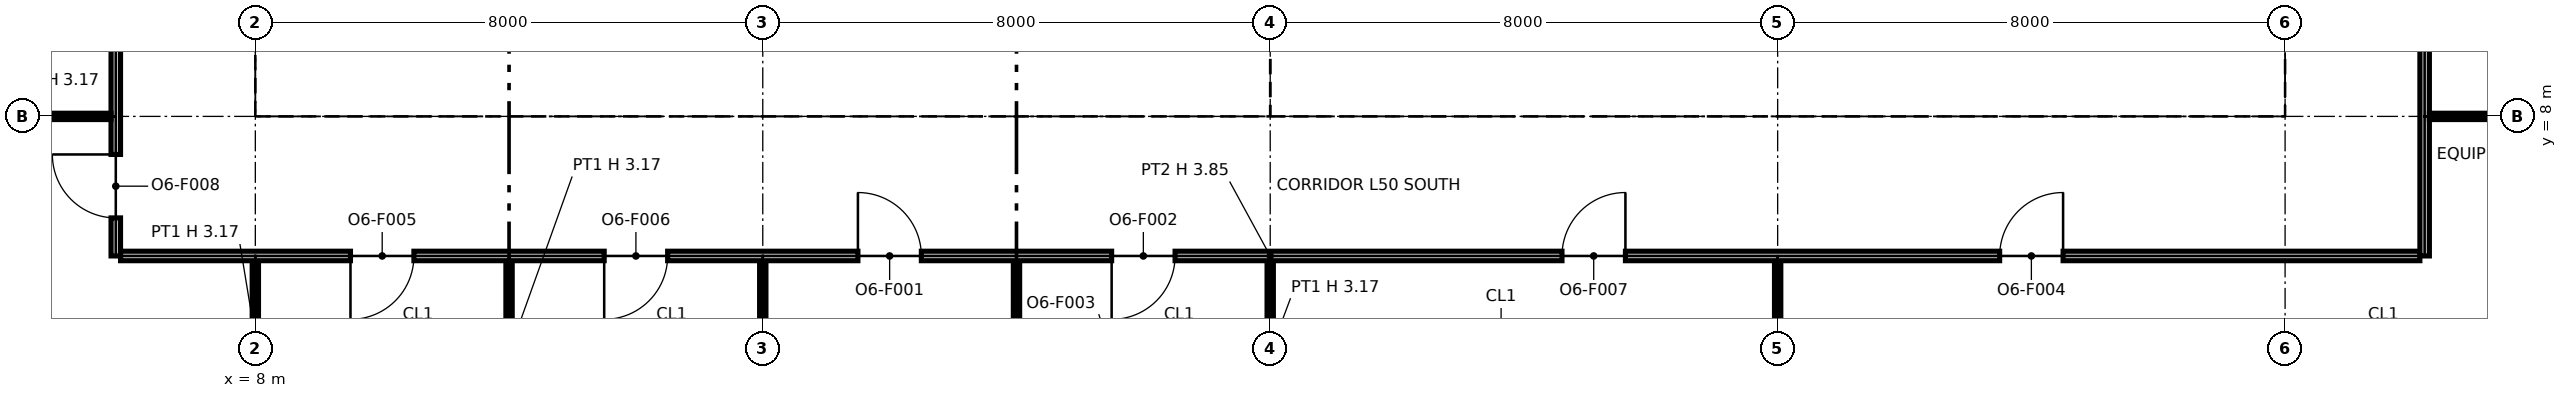
"""IFC4 building model, lengths in metres.
Left out: names, types, materials, properties, quantities, classifications, styles, units other than length and angle.
Written with IfcOpenShell. Run it as: python <this file> out.ifc"""

import sys

from ifc_helpers import new_model, si_unit, direction, frame, frame_2d, origin, origin_2d, place, context, subcontext, project, spatial, polyline, rectangle, i_section, outline, extrude, element, fill, save


model = new_model("IFC4")
c1 = context("Model", 3, precision=1e-05, world=origin(), true_north=direction((0.0, 1.0)))
c2 = subcontext(c1, "Body", "Model", "MODEL_VIEW")
j1 = project(units=[si_unit("LENGTHUNIT", "METRE"), si_unit("PLANEANGLEUNIT", "RADIAN")], contexts=[c1])
p1 = place(None, origin())
s1 = spatial("IfcSite", under=j1, at=p1, CompositionType="ELEMENT")
p2 = place(p1, origin())
s2 = spatial("IfcBuilding", under=s1, at=p2, CompositionType="ELEMENT")
p3 = place(p2, frame((0.0, 0.0, 233.0)))
s3 = spatial("IfcBuildingStorey", under=s2, at=p3, CompositionType="ELEMENT", Elevation=233.0)
for number, where, z_axis, x_axis in (
    (1, (8.0, 8.0, 0.0), (0.0, 0.0, 1.0), (1.0, 0.0, 0.0)),
    (2, (16.0, 8.0, 0.0), (0.0, 0.0, 1.0), (1.0, 0.0, 0.0)),
):
    element("IfcColumn", number, at=place(p3, frame(where, z_axis=z_axis, x_axis=x_axis)), inside=s3, PredefinedType="COLUMN", context=c2, shape_type="SweptSolid", body=[
        extrude(i_section(OverallWidth=0.373, OverallDepth=0.368, WebThickness=0.015, FlangeThickness=0.024, at=origin_2d()), origin(), (0.0, 0.0, 1.0), 3.85),
    ])
p4 = place(p3, frame((24.0, 8.0, 0.0), z_axis=(0.0, 0.0, 1.0), x_axis=(1.0, 0.0, 0.0)))
e3 = element("IfcColumn", 3, at=p4, inside=s3, PredefinedType="COLUMN", context=c2, shape_type="SweptSolid", body=[
    extrude(i_section(OverallWidth=0.394, OverallDepth=0.376, WebThickness=0.017, FlangeThickness=0.028, at=origin_2d()), origin(), (0.0, 0.0, 1.0), 3.85),
])
for number, where, z_axis, x_axis in (
    (4, (32.0, 8.0, 0.0), (0.0, 0.0, 1.0), (1.0, 0.0, 0.0)),
    (5, (40.0, 8.0, 0.0), (0.0, 0.0, 1.0), (1.0, 0.0, 0.0)),
):
    element("IfcColumn", number, at=place(p3, frame(where, z_axis=z_axis, x_axis=x_axis)), inside=s3, PredefinedType="COLUMN", context=c2, shape_type="SweptSolid", body=[
        extrude(i_section(OverallWidth=0.373, OverallDepth=0.368, WebThickness=0.015, FlangeThickness=0.024, at=origin_2d()), origin(), (0.0, 0.0, 1.0), 3.85),
    ])
p5 = place(p3, frame((8.65, 8.75, 0.0), z_axis=(0.0, 0.0, 1.0), x_axis=(1.0, 0.0, 0.0)))
e6 = element("IfcWall", 6, at=p5, inside=s3, PredefinedType="PARTITIONING", context=c2, shape_type="SweptSolid", body=[
    extrude(outline(polyline([(0.0, 0.0), (14.7, 0.0), (14.7, 3.85), (7.438, 3.85), (7.438, 3.308), (7.262, 3.308), (7.261, 3.85), (0.0, 3.85), (0.0, 0.0)])), frame((0.0, 0.1, 0.0), z_axis=(0.0, -1.0, 0.0), x_axis=(1.0, 0.0, 0.0)), (0.0, 0.0, 1.0), 0.2),
])
p6 = place(p5, frame((1.3, 0.0, 0.0)))
e7 = element("IfcOpeningElement", 7, at=p6, cuts=e6, PredefinedType="OPENING", context=c2, shape_type="SweptSolid", body=[
    extrude(rectangle(XDim=1.4, YDim=2.1, at=frame_2d((0.7, 1.05))), frame((0.0, 0.11, 0.0), z_axis=(0.0, -1.0, 0.0), x_axis=(1.0, 0.0, 0.0)), (0.0, 0.0, 1.0), 0.22),
])
p7 = place(p5, frame((4.6, 0.0, 0.0)))
e8 = element("IfcOpeningElement", 8, at=p7, cuts=e6, PredefinedType="OPENING", context=c2, shape_type="SweptSolid", body=[
    extrude(rectangle(XDim=1.4, YDim=2.1, at=frame_2d((0.7, 1.05))), frame((0.0, 0.11, 0.0), z_axis=(0.0, -1.0, 0.0), x_axis=(1.0, 0.0, 0.0)), (0.0, 0.0, 1.0), 0.22),
])
p8 = place(p5, frame((10.4, 0.0, 0.0)))
e9 = element("IfcOpeningElement", 9, at=p8, cuts=e6, PredefinedType="OPENING", context=c2, shape_type="SweptSolid", body=[
    extrude(rectangle(XDim=1.2, YDim=2.1, at=frame_2d((0.6, 1.05))), frame((0.0, 0.11, 0.0), z_axis=(0.0, -1.0, 0.0), x_axis=(1.0, 0.0, 0.0)), (0.0, 0.0, 1.0), 0.22),
])
p9 = place(p3, frame((8.75, 8.85, 0.0), z_axis=(0.0, 0.0, 1.0), x_axis=(0.0, 1.0, 0.0)))
e10 = element("IfcWall", 10, at=p9, inside=s3, PredefinedType="PARTITIONING", context=c2, shape_type="SweptSolid", body=[
    extrude(outline(polyline([(0.0, 0.0), (14.3, 0.0), (14.3, 3.85), (10.225, 3.85), (10.224, 3.44), (10.076, 3.44), (10.075, 3.85), (7.239, 3.85), (7.238, 3.308), (7.062, 3.308), (7.062, 3.85), (0.0, 3.85), (0.0, 0.0)])), frame((0.0, 0.1, 0.0), z_axis=(0.0, -1.0, 0.0), x_axis=(1.0, 0.0, 0.0)), (0.0, 0.0, 1.0), 0.2),
])
p10 = place(p9, frame((8.3, 0.0, 0.0)))
e11 = element("IfcOpeningElement", 11, at=p10, cuts=e10, PredefinedType="OPENING", context=c2, shape_type="SweptSolid", body=[
    extrude(rectangle(XDim=1.8, YDim=2.1, at=frame_2d((0.9, 1.05))), frame((0.0, 0.11, 0.0), z_axis=(0.0, -1.0, 0.0), x_axis=(1.0, 0.0, 0.0)), (0.0, 0.0, 1.0), 0.22),
])
p11 = place(p3, frame((12.4, 8.85, 0.0), z_axis=(0.0, 0.0, 1.0), x_axis=(0.0, 1.0, 0.0)))
e12 = element("IfcWall", 12, at=p11, inside=s3, PredefinedType="PARTITIONING", context=c2, shape_type="SweptSolid", body=[
    extrude(rectangle(XDim=6.85, YDim=0.2, at=frame_2d((3.425, 0.0))), origin(), (0.0, 0.0, 1.0), 3.85),
])
p12 = place(p3, frame((15.85, 8.85, 0.0), z_axis=(0.0, 0.0, 1.0), x_axis=(0.0, 1.0, 0.0)))
e13 = element("IfcWall", 13, at=p12, inside=s3, PredefinedType="PARTITIONING", context=c2, shape_type="SweptSolid", body=[
    extrude(rectangle(XDim=1.55, YDim=0.9, at=frame_2d((0.775, 0.0))), origin(), (0.0, 0.0, 1.0), 3.308),
])
p13 = place(p12, frame((0.3, 0.0, 0.0)))
e14 = element("IfcOpeningElement", 14, at=p13, cuts=e13, PredefinedType="OPENING", context=c2, shape_type="SweptSolid", body=[
    extrude(rectangle(XDim=1.1, YDim=2.1, at=frame_2d((0.55, 1.05))), frame((0.0, 0.46, 0.0), z_axis=(0.0, -1.0, 0.0), x_axis=(1.0, 0.0, 0.0)), (0.0, 0.0, 1.0), 0.92),
])
p14 = place(p3, frame((23.25, 8.85, 0.0), z_axis=(0.0, 0.0, 1.0), x_axis=(0.0, 1.0, 0.0)))
e15 = element("IfcWall", 15, at=p14, inside=s3, PredefinedType="PARTITIONING", context=c2, shape_type="SweptSolid", body=[
    extrude(outline(polyline([(0.0, 0.0), (14.3, 0.0), (14.3, 3.85), (10.225, 3.85), (10.224, 3.44), (10.076, 3.44), (10.075, 3.85), (7.239, 3.85), (7.238, 3.308), (7.062, 3.308), (7.062, 3.85), (5.225, 3.85), (5.224, 3.44), (5.076, 3.44), (5.075, 3.85), (0.0, 3.85), (0.0, 0.0)])), frame((0.0, 0.1, 0.0), z_axis=(0.0, -1.0, 0.0), x_axis=(1.0, 0.0, 0.0)), (0.0, 0.0, 1.0), 0.2),
])
p15 = place(p14, frame((8.3, 0.0, 0.0)))
e16 = element("IfcOpeningElement", 16, at=p15, cuts=e15, PredefinedType="OPENING", context=c2, shape_type="SweptSolid", body=[
    extrude(rectangle(XDim=1.8, YDim=2.1, at=frame_2d((0.9, 1.05))), frame((0.0, 0.11, 0.0), z_axis=(0.0, -1.0, 0.0), x_axis=(1.0, 0.0, 0.0)), (0.0, 0.0, 1.0), 0.22),
])
p16 = place(p3, frame((24.65, 8.75, 0.0), z_axis=(0.0, 0.0, 1.0), x_axis=(1.0, 0.0, 0.0)))
e17 = element("IfcWall", 17, at=p16, inside=s3, PredefinedType="PARTITIONING", context=c2, shape_type="SweptSolid", body=[
    extrude(outline(polyline([(0.0, 0.0), (14.7, 0.0), (14.7, 3.85), (7.438, 3.85), (7.438, 3.308), (7.262, 3.308), (7.261, 3.85), (0.0, 3.85), (0.0, 0.0)])), frame((0.0, 0.1, 0.0), z_axis=(0.0, -1.0, 0.0), x_axis=(1.0, 0.0, 0.0)), (0.0, 0.0, 1.0), 0.2),
])
p17 = place(p3, frame((24.75, 8.85, 0.0), z_axis=(0.0, 0.0, 1.0), x_axis=(0.0, 1.0, 0.0)))
e18 = element("IfcWall", 18, at=p17, inside=s3, PredefinedType="PARTITIONING", context=c2, shape_type="SweptSolid", body=[
    extrude(outline(polyline([(0.0, 0.0), (6.3, 0.0), (6.3, 3.85), (3.225, 3.85), (3.224, 3.44), (3.076, 3.44), (3.075, 3.85), (0.0, 3.85), (0.0, 0.0)])), frame((0.0, 0.1, 0.0), z_axis=(0.0, -1.0, 0.0), x_axis=(1.0, 0.0, 0.0)), (0.0, 0.0, 1.0), 0.2),
])
for number, where, z_axis, x_axis in (
    (19, (27.2, 8.85, 0.0), (0.0, 0.0, 1.0), (0.0, 1.0, 0.0)),
    (20, (29.5, 8.85, 0.0), (0.0, 0.0, 1.0), (0.0, 1.0, 0.0)),
):
    element("IfcWall", number, at=place(p3, frame(where, z_axis=z_axis, x_axis=x_axis)), inside=s3, PredefinedType="PARTITIONING", context=c2, shape_type="SweptSolid", body=[
        extrude(rectangle(XDim=2.55, YDim=0.2, at=frame_2d((1.275, 0.0))), origin(), (0.0, 0.0, 1.0), 3.85),
    ])
p18 = place(p3, frame((32.0, 8.85, 0.0), z_axis=(0.0, 0.0, 1.0), x_axis=(0.0, 1.0, 0.0)))
e21 = element("IfcWall", 21, at=p18, inside=s3, PredefinedType="PARTITIONING", context=c2, shape_type="SweptSolid", body=[
    extrude(rectangle(XDim=2.55, YDim=0.6, at=frame_2d((1.275, 0.0))), origin(), (0.0, 0.0, 1.0), 3.308),
])
for number, where, z_axis, x_axis in (
    (22, (35.6, 8.85, 0.0), (0.0, 0.0, 1.0), (0.0, 1.0, 0.0)),
    (23, (39.25, 8.85, 0.0), (0.0, 0.0, 1.0), (0.0, 1.0, 0.0)),
):
    element("IfcWall", number, at=place(p3, frame(where, z_axis=z_axis, x_axis=x_axis)), inside=s3, PredefinedType="PARTITIONING", context=c2, shape_type="SweptSolid", body=[
        extrude(rectangle(XDim=6.3, YDim=0.2, at=frame_2d((3.15, 0.0))), origin(), (0.0, 0.0, 1.0), 3.85),
    ])
p19 = place(p3, frame((20.0, 2.8, 0.0), z_axis=(0.0, 0.0, 1.0), x_axis=(0.0, 1.0, 0.0)))
e24 = element("IfcWall", 24, at=p19, inside=s3, PredefinedType="PARTITIONING", context=c2, shape_type="SweptSolid", body=[
    extrude(rectangle(XDim=2.925, YDim=0.1, at=frame_2d((1.462, 0.0))), origin(), (0.0, 0.0, 1.0), 3.172),
])
for number, where, z_axis, x_axis in (
    (25, (12.0, 2.83, 0.0), (0.0, 0.0, 1.0), (0.0, 1.0, 0.0)),
    (26, (16.0, 2.83, 0.0), (0.0, 0.0, 1.0), (0.0, 1.0, 0.0)),
    (27, (24.0, 2.83, 0.0), (0.0, 0.0, 1.0), (0.0, 1.0, 0.0)),
    (28, (32.0, 2.83, 0.0), (0.0, 0.0, 1.0), (0.0, 1.0, 0.0)),
):
    element("IfcWall", number, at=place(p3, frame(where, z_axis=z_axis, x_axis=x_axis)), inside=s3, PredefinedType="PARTITIONING", context=c2, shape_type="SweptSolid", body=[
        extrude(rectangle(XDim=2.895, YDim=0.1, at=frame_2d((1.448, 0.0))), origin(), (0.0, 0.0, 1.0), 3.172),
    ])
p20 = place(p3, frame((8.0, 3.3, 0.0), z_axis=(0.0, 0.0, 1.0), x_axis=(0.0, 1.0, 0.0)))
e29 = element("IfcWall", 29, at=p20, inside=s3, PredefinedType="PARTITIONING", context=c2, shape_type="SweptSolid", body=[
    extrude(rectangle(XDim=2.425, YDim=0.1, at=frame_2d((1.212, 0.0))), origin(), (0.0, 0.0, 1.0), 3.172),
])
p21 = place(p3, frame((5.875, 5.8, 0.0), z_axis=(0.0, 0.0, 1.0), x_axis=(1.0, 0.0, 0.0)))
e30 = element("IfcWall", 30, at=p21, inside=s3, PredefinedType="PARTITIONING", context=c2, shape_type="SweptSolid", body=[
    extrude(rectangle(XDim=36.25, YDim=0.15, at=frame_2d((18.125, 0.0))), origin(), (0.0, 0.0, 1.0), 3.85),
])
p22 = place(p21, frame((11.625, 0.0, 0.0)))
e31 = element("IfcOpeningElement", 31, at=p22, cuts=e30, PredefinedType="OPENING", context=c2, shape_type="SweptSolid", body=[
    extrude(rectangle(XDim=1.0, YDim=2.1, at=frame_2d((0.5, 1.05))), frame((0.0, 0.085, 0.0), z_axis=(0.0, -1.0, 0.0), x_axis=(1.0, 0.0, 0.0)), (0.0, 0.0, 1.0), 0.17),
])
p23 = place(p21, frame((16.625, 0.0, 0.0), z_axis=(0.0, 0.0, 1.0), x_axis=(-1.0, 0.0, 0.0)))
e32 = element("IfcOpeningElement", 32, at=p23, cuts=e30, PredefinedType="OPENING", context=c2, shape_type="SweptSolid", body=[
    extrude(rectangle(XDim=1.0, YDim=2.1, at=frame_2d((0.5, 1.05))), frame((0.0, 0.085, 0.0), z_axis=(0.0, -1.0, 0.0), x_axis=(1.0, 0.0, 0.0)), (0.0, 0.0, 1.0), 0.17),
])
p24 = place(p21, frame((29.625, 0.0, 0.0)))
e33 = element("IfcOpeningElement", 33, at=p24, cuts=e30, PredefinedType="OPENING", context=c2, shape_type="SweptSolid", body=[
    extrude(rectangle(XDim=1.0, YDim=2.1, at=frame_2d((0.5, 1.05))), frame((0.0, 0.085, 0.0), z_axis=(0.0, -1.0, 0.0), x_axis=(1.0, 0.0, 0.0)), (0.0, 0.0, 1.0), 0.17),
])
p25 = place(p21, frame((4.625, 0.0, 0.0), z_axis=(0.0, 0.0, 1.0), x_axis=(-1.0, 0.0, 0.0)))
e34 = element("IfcOpeningElement", 34, at=p25, cuts=e30, PredefinedType="OPENING", context=c2, shape_type="SweptSolid", body=[
    extrude(rectangle(XDim=1.0, YDim=2.1, at=frame_2d((0.5, 1.05))), frame((0.0, 0.085, 0.0), z_axis=(0.0, -1.0, 0.0), x_axis=(1.0, 0.0, 0.0)), (0.0, 0.0, 1.0), 0.17),
])
p26 = place(p21, frame((8.625, 0.0, 0.0), z_axis=(0.0, 0.0, 1.0), x_axis=(-1.0, 0.0, 0.0)))
e35 = element("IfcOpeningElement", 35, at=p26, cuts=e30, PredefinedType="OPENING", context=c2, shape_type="SweptSolid", body=[
    extrude(rectangle(XDim=1.0, YDim=2.1, at=frame_2d((0.5, 1.05))), frame((0.0, 0.085, 0.0), z_axis=(0.0, -1.0, 0.0), x_axis=(1.0, 0.0, 0.0)), (0.0, 0.0, 1.0), 0.17),
])
p27 = place(p21, frame((22.725, 0.0, 0.0)))
e36 = element("IfcOpeningElement", 36, at=p27, cuts=e30, PredefinedType="OPENING", context=c2, shape_type="SweptSolid", body=[
    extrude(rectangle(XDim=1.0, YDim=2.1, at=frame_2d((0.5, 1.05))), frame((0.0, 0.085, 0.0), z_axis=(0.0, -1.0, 0.0), x_axis=(1.0, 0.0, 0.0)), (0.0, 0.0, 1.0), 0.17),
])
p28 = place(p3, frame((5.8, 5.8, 0.0), z_axis=(0.0, 0.0, 1.0), x_axis=(0.0, 1.0, 0.0)))
e37 = element("IfcWall", 37, at=p28, inside=s3, PredefinedType="PARTITIONING", context=c2, shape_type="SweptSolid", body=[
    extrude(outline(polyline([(0.0, 0.0), (13.575, 0.0), (13.575, 3.85), (10.5, 3.85), (10.498, 3.172), (9.902, 3.172), (9.9, 3.85), (6.5, 3.85), (6.498, 3.172), (5.902, 3.172), (5.9, 3.85), (2.5, 3.85), (2.498, 3.172), (1.902, 3.172), (1.9, 3.85), (0.0, 3.85), (0.0, 0.0)])), frame((0.0, 0.075, 0.0), z_axis=(0.0, -1.0, 0.0), x_axis=(1.0, 0.0, 0.0)), (0.0, 0.0, 1.0), 0.15),
])
p29 = place(p28, frame((0.6, 0.0, 0.0)))
e38 = element("IfcOpeningElement", 38, at=p29, cuts=e37, PredefinedType="OPENING", context=c2, shape_type="SweptSolid", body=[
    extrude(rectangle(XDim=1.0, YDim=2.1, at=frame_2d((0.5, 1.05))), frame((0.0, 0.085, 0.0), z_axis=(0.0, -1.0, 0.0), x_axis=(1.0, 0.0, 0.0)), (0.0, 0.0, 1.0), 0.17),
])
p30 = place(p28, frame((3.7, 0.0, 0.0)))
e39 = element("IfcOpeningElement", 39, at=p30, cuts=e37, PredefinedType="OPENING", context=c2, shape_type="SweptSolid", body=[
    extrude(rectangle(XDim=1.0, YDim=2.1, at=frame_2d((0.5, 1.05))), frame((0.0, 0.085, 0.0), z_axis=(0.0, -1.0, 0.0), x_axis=(1.0, 0.0, 0.0)), (0.0, 0.0, 1.0), 0.17),
])
p31 = place(p28, frame((7.7, 0.0, 0.0)))
e40 = element("IfcOpeningElement", 40, at=p31, cuts=e37, PredefinedType="OPENING", context=c2, shape_type="SweptSolid", body=[
    extrude(rectangle(XDim=1.0, YDim=2.1, at=frame_2d((0.5, 1.05))), frame((0.0, 0.085, 0.0), z_axis=(0.0, -1.0, 0.0), x_axis=(1.0, 0.0, 0.0)), (0.0, 0.0, 1.0), 0.17),
])
p32 = place(p28, frame((11.425, 0.0, 0.0)))
e41 = element("IfcOpeningElement", 41, at=p32, cuts=e37, PredefinedType="OPENING", context=c2, shape_type="SweptSolid", body=[
    extrude(rectangle(XDim=1.0, YDim=2.1, at=frame_2d((0.5, 1.05))), frame((0.0, 0.085, 0.0), z_axis=(0.0, -1.0, 0.0), x_axis=(1.0, 0.0, 0.0)), (0.0, 0.0, 1.0), 0.17),
])
p33 = place(p3, frame((42.2, 5.8, 0.0), z_axis=(0.0, 0.0, 1.0), x_axis=(0.0, 1.0, 0.0)))
e42 = element("IfcWall", 42, at=p33, inside=s3, PredefinedType="PARTITIONING", context=c2, shape_type="SweptSolid", body=[
    extrude(outline(polyline([(0.0, 0.0), (12.325, 0.0), (12.325, 3.85), (10.5, 3.85), (10.498, 3.172), (9.902, 3.172), (9.9, 3.85), (6.5, 3.85), (6.498, 3.172), (5.902, 3.172), (5.9, 3.85), (2.5, 3.85), (2.498, 3.172), (1.902, 3.172), (1.9, 3.85), (0.0, 3.85), (0.0, 0.0)])), frame((0.0, 0.075, 0.0), z_axis=(0.0, -1.0, 0.0), x_axis=(1.0, 0.0, 0.0)), (0.0, 0.0, 1.0), 0.15),
])
p34 = place(p33, frame((4.7, 0.0, 0.0), z_axis=(0.0, 0.0, 1.0), x_axis=(-1.0, 0.0, 0.0)))
e43 = element("IfcOpeningElement", 43, at=p34, cuts=e42, PredefinedType="OPENING", context=c2, shape_type="SweptSolid", body=[
    extrude(rectangle(XDim=1.0, YDim=2.1, at=frame_2d((0.5, 1.05))), frame((0.0, 0.085, 0.0), z_axis=(0.0, -1.0, 0.0), x_axis=(1.0, 0.0, 0.0)), (0.0, 0.0, 1.0), 0.17),
])
p35 = place(p33, frame((8.7, 0.0, 0.0), z_axis=(0.0, 0.0, 1.0), x_axis=(-1.0, 0.0, 0.0)))
e44 = element("IfcOpeningElement", 44, at=p35, cuts=e42, PredefinedType="OPENING", context=c2, shape_type="SweptSolid", body=[
    extrude(rectangle(XDim=1.0, YDim=2.1, at=frame_2d((0.5, 1.05))), frame((0.0, 0.085, 0.0), z_axis=(0.0, -1.0, 0.0), x_axis=(1.0, 0.0, 0.0)), (0.0, 0.0, 1.0), 0.17),
])
for number, where, z_axis, x_axis in (
    (45, (2.83, 8.0, 0.0), (0.0, 0.0, 1.0), (1.0, 0.0, 0.0)),
    (46, (42.275, 8.0, 0.0), (0.0, 0.0, 1.0), (1.0, 0.0, 0.0)),
):
    element("IfcWall", number, at=place(p3, frame(where, z_axis=z_axis, x_axis=x_axis)), inside=s3, PredefinedType="PARTITIONING", context=c2, shape_type="SweptSolid", body=[
        extrude(rectangle(XDim=2.895, YDim=0.1, at=frame_2d((1.448, 0.0))), origin(), (0.0, 0.0, 1.0), 3.172),
    ])
p36 = place(p6, origin())
e47 = element("IfcDoor", 47, at=p36, inside=s3, OperationType="DOUBLE_DOOR_SINGLE_SWING", PredefinedType="NOTDEFINED", context=c2, shape_type="SweptSolid", body=[
    extrude(rectangle(XDim=1.4, YDim=2.1, at=frame_2d((0.7, 1.05))), frame((0.0, 0.025, 0.0), z_axis=(0.0, -1.0, 0.0), x_axis=(1.0, 0.0, 0.0)), (0.0, 0.0, 1.0), 0.05),
])
fill(e7, e47)
p37 = place(p7, origin())
e48 = element("IfcDoor", 48, at=p37, inside=s3, OperationType="DOUBLE_DOOR_SINGLE_SWING", PredefinedType="NOTDEFINED", context=c2, shape_type="SweptSolid", body=[
    extrude(rectangle(XDim=1.4, YDim=2.1, at=frame_2d((0.7, 1.05))), frame((0.0, 0.025, 0.0), z_axis=(0.0, -1.0, 0.0), x_axis=(1.0, 0.0, 0.0)), (0.0, 0.0, 1.0), 0.05),
])
fill(e8, e48)
p38 = place(p8, origin())
e49 = element("IfcDoor", 49, at=p38, inside=s3, OperationType="SINGLE_SWING_LEFT", PredefinedType="NOTDEFINED", context=c2, shape_type="SweptSolid", body=[
    extrude(rectangle(XDim=1.2, YDim=2.1, at=frame_2d((0.6, 1.05))), frame((0.0, 0.025, 0.0), z_axis=(0.0, -1.0, 0.0), x_axis=(1.0, 0.0, 0.0)), (0.0, 0.0, 1.0), 0.05),
])
fill(e9, e49)
p39 = place(p22, origin())
e50 = element("IfcDoor", 50, at=p39, inside=s3, OperationType="SINGLE_SWING_LEFT", PredefinedType="DOOR", context=c2, shape_type="SweptSolid", body=[
    extrude(rectangle(XDim=1.0, YDim=2.1, at=frame_2d((0.5, 1.05))), frame((0.0, 0.025, 0.0), z_axis=(0.0, -1.0, 0.0), x_axis=(1.0, 0.0, 0.0)), (0.0, 0.0, 1.0), 0.05),
])
fill(e31, e50)
p40 = place(p23, origin())
e51 = element("IfcDoor", 51, at=p40, inside=s3, OperationType="SINGLE_SWING_RIGHT", PredefinedType="DOOR", context=c2, shape_type="SweptSolid", body=[
    extrude(rectangle(XDim=1.0, YDim=2.1, at=frame_2d((0.5, 1.05))), frame((0.0, 0.025, 0.0), z_axis=(0.0, -1.0, 0.0), x_axis=(1.0, 0.0, 0.0)), (0.0, 0.0, 1.0), 0.05),
])
fill(e32, e51)
p41 = place(p24, origin())
e52 = element("IfcDoor", 52, at=p41, inside=s3, OperationType="SINGLE_SWING_RIGHT", PredefinedType="DOOR", context=c2, shape_type="SweptSolid", body=[
    extrude(rectangle(XDim=1.0, YDim=2.1, at=frame_2d((0.5, 1.05))), frame((0.0, 0.025, 0.0), z_axis=(0.0, -1.0, 0.0), x_axis=(1.0, 0.0, 0.0)), (0.0, 0.0, 1.0), 0.05),
])
fill(e33, e52)
p42 = place(p25, origin())
e53 = element("IfcDoor", 53, at=p42, inside=s3, OperationType="SINGLE_SWING_RIGHT", PredefinedType="DOOR", context=c2, shape_type="SweptSolid", body=[
    extrude(rectangle(XDim=1.0, YDim=2.1, at=frame_2d((0.5, 1.05))), frame((0.0, 0.025, 0.0), z_axis=(0.0, -1.0, 0.0), x_axis=(1.0, 0.0, 0.0)), (0.0, 0.0, 1.0), 0.05),
])
fill(e34, e53)
p43 = place(p26, origin())
e54 = element("IfcDoor", 54, at=p43, inside=s3, OperationType="SINGLE_SWING_RIGHT", PredefinedType="DOOR", context=c2, shape_type="SweptSolid", body=[
    extrude(rectangle(XDim=1.0, YDim=2.1, at=frame_2d((0.5, 1.05))), frame((0.0, 0.025, 0.0), z_axis=(0.0, -1.0, 0.0), x_axis=(1.0, 0.0, 0.0)), (0.0, 0.0, 1.0), 0.05),
])
fill(e35, e54)
p44 = place(p27, origin())
e55 = element("IfcDoor", 55, at=p44, inside=s3, OperationType="SINGLE_SWING_RIGHT", PredefinedType="DOOR", context=c2, shape_type="SweptSolid", body=[
    extrude(rectangle(XDim=1.0, YDim=2.1, at=frame_2d((0.5, 1.05))), frame((0.0, 0.025, 0.0), z_axis=(0.0, -1.0, 0.0), x_axis=(1.0, 0.0, 0.0)), (0.0, 0.0, 1.0), 0.05),
])
fill(e36, e55)
p45 = place(p29, origin())
e56 = element("IfcDoor", 56, at=p45, inside=s3, OperationType="SINGLE_SWING_RIGHT", PredefinedType="DOOR", context=c2, shape_type="SweptSolid", body=[
    extrude(rectangle(XDim=1.0, YDim=2.1, at=frame_2d((0.5, 1.05))), frame((0.0, 0.025, 0.0), z_axis=(0.0, -1.0, 0.0), x_axis=(1.0, 0.0, 0.0)), (0.0, 0.0, 1.0), 0.05),
])
fill(e38, e56)
save(model, sys.argv[1])
